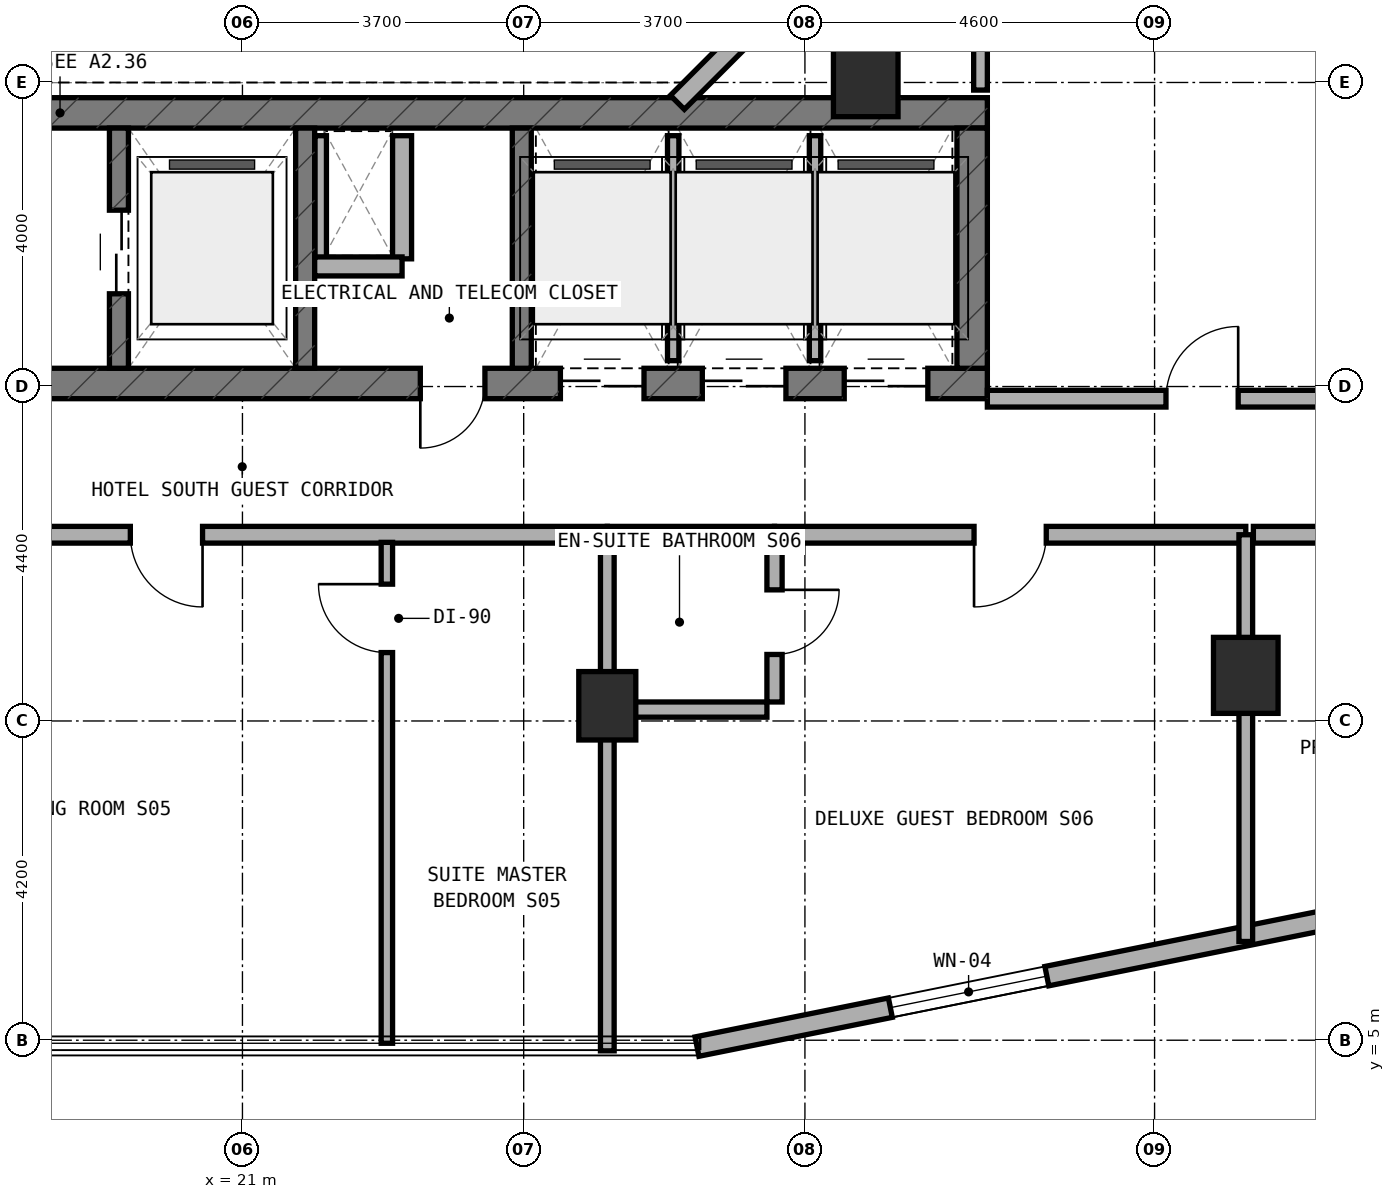
"""IFC4 building model, lengths in metres.
Left out: names, types, materials, properties, quantities, classifications, styles, units other than length and angle.
Written with IfcOpenShell. Run it as: python <this file> out.ifc"""

import sys

from ifc_helpers import new_model, si_unit, direction, frame, frame_2d, origin, origin_2d, place, context, subcontext, project, spatial, rectangle, extrude, element, fill, save


model = new_model("IFC4")
c1 = context("Model", 3, precision=1e-05, world=origin(), true_north=direction((0.0, 1.0)))
c2 = subcontext(c1, "Body", "Model", "MODEL_VIEW")
j1 = project(units=[si_unit("LENGTHUNIT", "METRE"), si_unit("PLANEANGLEUNIT", "RADIAN")], contexts=[c1])
p1 = place(None, origin())
s1 = spatial("IfcSite", under=j1, at=p1, CompositionType="ELEMENT")
p2 = place(p1, origin())
s2 = spatial("IfcBuilding", under=s1, at=p2, CompositionType="ELEMENT")
p3 = place(p2, frame((0.0, 0.0, 159.0)))
s3 = spatial("IfcBuildingStorey", under=s2, at=p3, CompositionType="ELEMENT", Elevation=159.0)
p4 = place(p3, frame((6.4, 13.64, 0.0), z_axis=(0.0, 0.0, 1.0), x_axis=(1.0, 0.0, 0.0)))
e1 = element("IfcWall", 1, at=p4, inside=s3, PredefinedType="SHEAR", context=c2, shape_type="SweptSolid", body=[
    extrude(rectangle(XDim=24.4, YDim=0.4, at=frame_2d((12.2, 0.0))), origin(), (0.0, 0.0, 1.0), 3.5),
])
p5 = place(p4, frame((9.15, 0.0, 0.0)))
e2 = element("IfcOpeningElement", 2, at=p5, cuts=e1, PredefinedType="OPENING", context=c2, shape_type="SweptSolid", body=[
    extrude(rectangle(XDim=1.2, YDim=2.15, at=frame_2d((0.6, 1.075))), frame((0.0, 0.21, 0.0), z_axis=(0.0, -1.0, 0.0), x_axis=(1.0, 0.0, 0.0)), (0.0, 0.0, 1.0), 0.42),
])
p6 = place(p4, frame((16.94, 0.0, 0.0)))
e3 = element("IfcOpeningElement", 3, at=p6, cuts=e1, PredefinedType="OPENING", context=c2, shape_type="SweptSolid", body=[
    extrude(rectangle(XDim=0.85, YDim=2.1, at=frame_2d((0.425, 1.05))), frame((0.0, 0.21, 0.0), z_axis=(0.0, -1.0, 0.0), x_axis=(1.0, 0.0, 0.0)), (0.0, 0.0, 1.0), 0.42),
])
p7 = place(p4, frame((18.783, 0.0, 0.0)))
e4 = element("IfcOpeningElement", 4, at=p7, cuts=e1, PredefinedType="OPENING", context=c2, shape_type="SweptSolid", body=[
    extrude(rectangle(XDim=1.1, YDim=2.15, at=frame_2d((0.55, 1.075))), frame((0.0, 0.21, 0.0), z_axis=(0.0, -1.0, 0.0), x_axis=(1.0, 0.0, 0.0)), (0.0, 0.0, 1.0), 0.42),
])
p8 = place(p4, frame((20.65, 0.0, 0.0)))
e5 = element("IfcOpeningElement", 5, at=p8, cuts=e1, PredefinedType="OPENING", context=c2, shape_type="SweptSolid", body=[
    extrude(rectangle(XDim=1.1, YDim=2.15, at=frame_2d((0.55, 1.075))), frame((0.0, 0.21, 0.0), z_axis=(0.0, -1.0, 0.0), x_axis=(1.0, 0.0, 0.0)), (0.0, 0.0, 1.0), 0.42),
])
p9 = place(p4, frame((22.517, 0.0, 0.0)))
e6 = element("IfcOpeningElement", 6, at=p9, cuts=e1, PredefinedType="OPENING", context=c2, shape_type="SweptSolid", body=[
    extrude(rectangle(XDim=1.1, YDim=2.15, at=frame_2d((0.55, 1.075))), frame((0.0, 0.21, 0.0), z_axis=(0.0, -1.0, 0.0), x_axis=(1.0, 0.0, 0.0)), (0.0, 0.0, 1.0), 0.42),
])
p10 = place(p3, frame((6.4, 17.2, 0.0), z_axis=(0.0, 0.0, 1.0), x_axis=(1.0, 0.0, 0.0)))
e7 = element("IfcWall", 7, at=p10, inside=s3, PredefinedType="SHEAR", context=c2, shape_type="SweptSolid", body=[
    extrude(rectangle(XDim=24.4, YDim=0.4, at=frame_2d((12.2, 0.0))), origin(), (0.0, 0.0, 1.0), 3.5),
])
p11 = place(p3, frame((30.6, 13.84, 0.0), z_axis=(0.0, 0.0, 1.0), x_axis=(0.0, 1.0, 0.0)))
e8 = element("IfcWall", 8, at=p11, inside=s3, PredefinedType="SHEAR", context=c2, shape_type="SweptSolid", body=[
    extrude(rectangle(XDim=3.16, YDim=0.4, at=frame_2d((1.58, 0.0))), origin(), (0.0, 0.0, 1.0), 3.5),
])
p12 = place(p3, frame((19.375, 13.84, 0.0), z_axis=(0.0, 0.0, 1.0), x_axis=(0.0, 1.0, 0.0)))
e9 = element("IfcWall", 9, at=p12, inside=s3, PredefinedType="STANDARD", context=c2, shape_type="SweptSolid", body=[
    extrude(rectangle(XDim=3.16, YDim=0.25, at=frame_2d((1.58, 0.0))), origin(), (0.0, 0.0, 1.0), 3.22),
])
p13 = place(p12, frame((0.98, 0.0, 0.0)))
e10 = element("IfcOpeningElement", 10, at=p13, cuts=e9, PredefinedType="OPENING", context=c2, shape_type="SweptSolid", body=[
    extrude(rectangle(XDim=1.1, YDim=2.15, at=frame_2d((0.55, 1.075))), frame((0.0, 0.135, 0.0), z_axis=(0.0, -1.0, 0.0), x_axis=(1.0, 0.0, 0.0)), (0.0, 0.0, 1.0), 0.27),
])
for number, where, z_axis, x_axis in (
    (11, (21.825, 13.84, 0.0), (0.0, 0.0, 1.0), (0.0, 1.0, 0.0)),
    (12, (24.675, 13.84, 0.0), (0.0, 0.0, 1.0), (0.0, 1.0, 0.0)),
):
    element("IfcWall", number, at=place(p3, frame(where, z_axis=z_axis, x_axis=x_axis)), inside=s3, PredefinedType="STANDARD", context=c2, shape_type="SweptSolid", body=[
        extrude(rectangle(XDim=3.16, YDim=0.25, at=frame_2d((1.58, 0.0))), origin(), (0.0, 0.0, 1.0), 3.22),
    ])
p14 = place(p3, frame((25.8, 9.4, 0.0), z_axis=(0.0, 0.0, 1.0), x_axis=(1.0, 0.0, 0.0)))
e13 = element("IfcColumn", 13, at=p14, inside=s3, PredefinedType="COLUMN", context=c2, shape_type="SweptSolid", body=[
    extrude(rectangle(XDim=0.75, YDim=0.9, at=origin_2d()), origin(), (0.0, 0.0, 1.0), 3.5),
])
for number, where, z_axis, x_axis in (
    (14, (34.2, 9.8, 0.0), (0.0, 0.0, 1.0), (1.0, 0.0, 0.0)),
    (15, (29.2, 17.65, 0.0), (0.0, 0.0, 1.0), (1.0, 0.0, 0.0)),
):
    element("IfcColumn", number, at=place(p3, frame(where, z_axis=z_axis, x_axis=x_axis)), inside=s3, PredefinedType="COLUMN", context=c2, shape_type="SweptSolid", body=[
        extrude(rectangle(XDim=0.85, YDim=1.0, at=origin_2d()), origin(), (0.0, 0.0, 1.0), 3.5),
    ])
p15 = place(p3, frame((26.98, 4.916, 0.0), z_axis=(0.0, 0.0, 1.0), x_axis=(0.980315963543, 0.197435082048, 0.0)))
e16 = element("IfcWall", 16, at=p15, inside=s3, PredefinedType="STANDARD", context=c2, shape_type="SweptSolid", body=[
    extrude(rectangle(XDim=9.183, YDim=0.26, at=frame_2d((4.591, 0.0))), origin(), (0.0, 0.0, 1.0), 3.22),
])
p16 = place(p15, frame((2.595, 0.0, 0.85)))
e17 = element("IfcOpeningElement", 17, at=p16, cuts=e16, PredefinedType="OPENING", context=c2, shape_type="SweptSolid", body=[
    extrude(rectangle(XDim=2.1, YDim=1.5, at=frame_2d((1.05, 0.75))), frame((0.0, 0.14, 0.0), z_axis=(0.0, -1.0, 0.0), x_axis=(1.0, 0.0, 0.0)), (0.0, 0.0, 1.0), 0.28),
])
p17 = place(p3, frame((26.722, 17.338, 0.0), z_axis=(0.0, 0.0, 1.0), x_axis=(0.707059717605, 0.707153841636, 0.0)))
e18 = element("IfcWall", 18, at=p17, inside=s3, PredefinedType="STANDARD", context=c2, shape_type="SweptSolid", body=[
    extrude(rectangle(XDim=2.594, YDim=0.26, at=frame_2d((1.297, 0.0))), origin(), (0.0, 0.0, 1.0), 3.22),
])
p18 = place(p3, frame((22.03, 15.28, 0.0), z_axis=(0.0, 0.0, 1.0), x_axis=(0.0, 1.0, 0.0)))
e19 = element("IfcWall", 19, at=p18, inside=s3, PredefinedType="PARTITIONING", context=c2, shape_type="SweptSolid", body=[
    extrude(rectangle(XDim=1.62, YDim=0.15, at=frame_2d((0.81, 0.0))), origin(), (0.0, 0.0, 1.0), 3.22),
])
p19 = place(p3, frame((23.1, 15.28, 0.0), z_axis=(0.0, 0.0, 1.0), x_axis=(0.0, 1.0, 0.0)))
e20 = element("IfcWall", 20, at=p19, inside=s3, PredefinedType="SOLIDWALL", context=c2, shape_type="SweptSolid", body=[
    extrude(rectangle(XDim=1.62, YDim=0.25, at=frame_2d((0.81, 0.0))), origin(), (0.0, 0.0, 1.0), 3.22),
])
p20 = place(p3, frame((21.95, 15.18, 0.0), z_axis=(0.0, 0.0, 1.0), x_axis=(1.0, 0.0, 0.0)))
e21 = element("IfcWall", 21, at=p20, inside=s3, PredefinedType="SOLIDWALL", context=c2, shape_type="SweptSolid", body=[
    extrude(rectangle(XDim=1.15, YDim=0.25, at=frame_2d((0.575, 0.0))), origin(), (0.0, 0.0, 1.0), 3.22),
])
p21 = place(p3, frame((26.667, 13.94, 0.0), z_axis=(0.0, 0.0, 1.0), x_axis=(0.0, 1.0, 0.0)))
e22 = element("IfcWall", 22, at=p21, inside=s3, PredefinedType="PARTITIONING", context=c2, shape_type="SweptSolid", body=[
    extrude(rectangle(XDim=2.96, YDim=0.15, at=frame_2d((1.48, 0.0))), origin(), (0.0, 0.0, 1.0), 3.22),
])
p22 = place(p3, frame((28.533, 13.94, 0.0), z_axis=(0.0, 0.0, 1.0), x_axis=(0.0, 1.0, 0.0)))
e23 = element("IfcWall", 23, at=p22, inside=s3, PredefinedType="PARTITIONING", context=c2, shape_type="SweptSolid", body=[
    extrude(rectangle(XDim=2.96, YDim=0.15, at=frame_2d((1.48, 0.0))), origin(), (0.0, 0.0, 1.0), 2.795),
])
p23 = place(p3, frame((14.2, 11.65, 0.0), z_axis=(0.0, 0.0, 1.0), x_axis=(1.0, 0.0, 0.0)))
e24 = element("IfcWall", 24, at=p23, inside=s3, PredefinedType="SOLIDWALL", context=c2, shape_type="SweptSolid", body=[
    extrude(rectangle(XDim=11.6, YDim=0.22, at=frame_2d((5.8, 0.0))), origin(), (0.0, 0.0, 1.0), 2.795),
])
p24 = place(p23, frame((5.325, 0.0, 0.0)))
e25 = element("IfcOpeningElement", 25, at=p24, cuts=e24, PredefinedType="OPENING", context=c2, shape_type="SweptSolid", body=[
    extrude(rectangle(XDim=0.95, YDim=2.1, at=frame_2d((0.475, 1.05))), frame((0.0, 0.12, 0.0), z_axis=(0.0, -1.0, 0.0), x_axis=(1.0, 0.0, 0.0)), (0.0, 0.0, 1.0), 0.24),
])
p25 = place(p3, frame((22.9, 4.96, 0.0), z_axis=(0.0, 0.0, 1.0), x_axis=(0.0, 1.0, 0.0)))
e26 = element("IfcWall", 26, at=p25, inside=s3, PredefinedType="PARTITIONING", context=c2, shape_type="SweptSolid", body=[
    extrude(rectangle(XDim=6.59, YDim=0.15, at=frame_2d((3.295, 0.0))), origin(), (0.0, 0.0, 1.0), 2.835),
])
p26 = place(p25, frame((5.14, 0.0, 0.0)))
e27 = element("IfcOpeningElement", 27, at=p26, cuts=e26, PredefinedType="OPENING", context=c2, shape_type="SweptSolid", body=[
    extrude(rectangle(XDim=0.9, YDim=2.1, at=frame_2d((0.45, 1.05))), frame((0.0, 0.085, 0.0), z_axis=(0.0, -1.0, 0.0), x_axis=(1.0, 0.0, 0.0)), (0.0, 0.0, 1.0), 0.17),
])
p27 = place(p3, frame((25.8, 4.86, 0.0), z_axis=(0.0, 0.0, 1.0), x_axis=(0.0, 1.0, 0.0)))
e28 = element("IfcWall", 28, at=p27, inside=s3, PredefinedType="SOLIDWALL", context=c2, shape_type="SweptSolid", body=[
    extrude(rectangle(XDim=6.79, YDim=0.18, at=frame_2d((3.395, 0.0))), origin(), (0.0, 0.0, 1.0), 2.795),
])
p28 = place(p3, frame((28.0, 9.45, 0.0), z_axis=(0.0, 0.0, 1.0), x_axis=(0.0, 1.0, 0.0)))
e29 = element("IfcWall", 29, at=p28, inside=s3, PredefinedType="PLUMBINGWALL", context=c2, shape_type="SweptSolid", body=[
    extrude(rectangle(XDim=2.1, YDim=0.2, at=frame_2d((1.05, 0.0))), origin(), (0.0, 0.0, 1.0), 2.835),
])
p29 = place(p28, frame((0.625, 0.0, 0.0)))
e30 = element("IfcOpeningElement", 30, at=p29, cuts=e29, PredefinedType="OPENING", context=c2, shape_type="SweptSolid", body=[
    extrude(rectangle(XDim=0.85, YDim=2.1, at=frame_2d((0.425, 1.05))), frame((0.0, 0.11, 0.0), z_axis=(0.0, -1.0, 0.0), x_axis=(1.0, 0.0, 0.0)), (0.0, 0.0, 1.0), 0.22),
])
p30 = place(p3, frame((25.9, 9.35, 0.0), z_axis=(0.0, 0.0, 1.0), x_axis=(1.0, 0.0, 0.0)))
e31 = element("IfcWall", 31, at=p30, inside=s3, PredefinedType="PLUMBINGWALL", context=c2, shape_type="SweptSolid", body=[
    extrude(rectangle(XDim=2.0, YDim=0.2, at=frame_2d((1.0, 0.0))), origin(), (0.0, 0.0, 1.0), 2.835),
])
p31 = place(p3, frame((25.8, 11.65, 0.0), z_axis=(0.0, 0.0, 1.0), x_axis=(1.0, 0.0, 0.0)))
e32 = element("IfcWall", 32, at=p31, inside=s3, PredefinedType="SOLIDWALL", context=c2, shape_type="SweptSolid", body=[
    extrude(rectangle(XDim=2.2, YDim=0.22, at=frame_2d((1.1, 0.0))), origin(), (0.0, 0.0, 1.0), 2.795),
])
p32 = place(p3, frame((28.0, 11.65, 0.0), z_axis=(0.0, 0.0, 1.0), x_axis=(1.0, 0.0, 0.0)))
e33 = element("IfcWall", 33, at=p32, inside=s3, PredefinedType="SOLIDWALL", context=c2, shape_type="SweptSolid", body=[
    extrude(rectangle(XDim=6.2, YDim=0.22, at=frame_2d((3.1, 0.0))), origin(), (0.0, 0.0, 1.0), 2.795),
])
p33 = place(p32, frame((2.625, 0.0, 0.0)))
e34 = element("IfcOpeningElement", 34, at=p33, cuts=e33, PredefinedType="OPENING", context=c2, shape_type="SweptSolid", body=[
    extrude(rectangle(XDim=0.95, YDim=2.1, at=frame_2d((0.475, 1.05))), frame((0.0, 0.12, 0.0), z_axis=(0.0, -1.0, 0.0), x_axis=(1.0, 0.0, 0.0)), (0.0, 0.0, 1.0), 0.24),
])
p34 = place(p3, frame((34.2, 6.299, 0.0), z_axis=(0.0, 0.0, 1.0), x_axis=(0.0, 1.0, 0.0)))
e35 = element("IfcWall", 35, at=p34, inside=s3, PredefinedType="SOLIDWALL", context=c2, shape_type="SweptSolid", body=[
    extrude(rectangle(XDim=5.351, YDim=0.18, at=frame_2d((2.675, 0.0))), origin(), (0.0, 0.0, 1.0), 2.795),
])
p35 = place(p3, frame((34.3, 11.65, 0.0), z_axis=(0.0, 0.0, 1.0), x_axis=(1.0, 0.0, 0.0)))
e36 = element("IfcWall", 36, at=p35, inside=s3, PredefinedType="SOLIDWALL", context=c2, shape_type="SweptSolid", body=[
    extrude(rectangle(XDim=6.64, YDim=0.22, at=frame_2d((3.32, 0.0))), origin(), (0.0, 0.0, 1.0), 2.835),
])
p36 = place(p35, frame((2.55, 0.0, 0.0)))
e37 = element("IfcOpeningElement", 37, at=p36, cuts=e36, PredefinedType="OPENING", context=c2, shape_type="SweptSolid", body=[
    extrude(rectangle(XDim=0.95, YDim=2.1, at=frame_2d((0.475, 1.05))), frame((0.0, 0.12, 0.0), z_axis=(0.0, -1.0, 0.0), x_axis=(1.0, 0.0, 0.0)), (0.0, 0.0, 1.0), 0.24),
])
p37 = place(p3, frame((30.71, 17.5, 0.0), z_axis=(0.0, 0.0, 1.0), x_axis=(0.0, 1.0, 0.0)))
e38 = element("IfcWall", 38, at=p37, inside=s3, PredefinedType="SOLIDWALL", context=c2, shape_type="SweptSolid", body=[
    extrude(rectangle(XDim=15.0, YDim=0.18, at=frame_2d((7.5, 0.0))), origin(), (0.0, 0.0, 1.0), 2.795),
])
p38 = place(p3, frame((30.8, 13.44, 0.0), z_axis=(0.0, 0.0, 1.0), x_axis=(1.0, 0.0, 0.0)))
e39 = element("IfcWall", 39, at=p38, inside=s3, PredefinedType="SOLIDWALL", context=c2, shape_type="SweptSolid", body=[
    extrude(rectangle(XDim=5.65, YDim=0.22, at=frame_2d((2.825, 0.0))), origin(), (0.0, 0.0, 1.0), 2.795),
])
p39 = place(p38, frame((2.35, 0.0, 0.0)))
e40 = element("IfcOpeningElement", 40, at=p39, cuts=e39, PredefinedType="OPENING", context=c2, shape_type="SweptSolid", body=[
    extrude(rectangle(XDim=0.95, YDim=2.1, at=frame_2d((0.475, 1.05))), frame((0.0, 0.12, 0.0), z_axis=(0.0, -1.0, 0.0), x_axis=(1.0, 0.0, 0.0)), (0.0, 0.0, 1.0), 0.24),
])
p40 = place(p16, origin())
e41 = element("IfcWindow", 41, at=p40, inside=s3, PartitioningType="SINGLE_PANEL", PredefinedType="WINDOW", context=c2, shape_type="SweptSolid", body=[
    extrude(rectangle(XDim=2.1, YDim=1.5, at=frame_2d((1.05, 0.75))), frame((0.0, 0.03, 0.0), z_axis=(0.0, -1.0, 0.0), x_axis=(1.0, 0.0, 0.0)), (0.0, 0.0, 1.0), 0.06),
])
fill(e17, e41)
p41 = place(p13, origin())
e42 = element("IfcDoor", 42, at=p41, inside=s3, OperationType="DOUBLE_DOOR_SLIDING", PredefinedType="DOOR", context=c2, shape_type="SweptSolid", body=[
    extrude(rectangle(XDim=1.1, YDim=2.15, at=frame_2d((0.55, 1.075))), frame((0.0, 0.025, 0.0), z_axis=(0.0, -1.0, 0.0), x_axis=(1.0, 0.0, 0.0)), (0.0, 0.0, 1.0), 0.05),
])
fill(e10, e42)
p42 = place(p6, frame((0.85, 0.0, 0.0), z_axis=(0.0, 0.0, 1.0), x_axis=(-1.0, 0.0, 0.0)))
e43 = element("IfcDoor", 43, at=p42, inside=s3, OperationType="SINGLE_SWING_RIGHT", PredefinedType="DOOR", context=c2, shape_type="SweptSolid", body=[
    extrude(rectangle(XDim=0.85, YDim=2.1, at=frame_2d((0.425, 1.05))), frame((0.0, 0.025, 0.0), z_axis=(0.0, -1.0, 0.0), x_axis=(1.0, 0.0, 0.0)), (0.0, 0.0, 1.0), 0.05),
])
fill(e3, e43)
p43 = place(p7, frame((1.1, 0.0, 0.0), z_axis=(0.0, 0.0, 1.0), x_axis=(-1.0, 0.0, 0.0)))
e44 = element("IfcDoor", 44, at=p43, inside=s3, OperationType="DOUBLE_DOOR_SLIDING", PredefinedType="DOOR", context=c2, shape_type="SweptSolid", body=[
    extrude(rectangle(XDim=1.1, YDim=2.15, at=frame_2d((0.55, 1.075))), frame((0.0, 0.025, 0.0), z_axis=(0.0, -1.0, 0.0), x_axis=(1.0, 0.0, 0.0)), (0.0, 0.0, 1.0), 0.05),
])
fill(e4, e44)
p44 = place(p8, frame((1.1, 0.0, 0.0), z_axis=(0.0, 0.0, 1.0), x_axis=(-1.0, 0.0, 0.0)))
e45 = element("IfcDoor", 45, at=p44, inside=s3, OperationType="DOUBLE_DOOR_SLIDING", PredefinedType="DOOR", context=c2, shape_type="SweptSolid", body=[
    extrude(rectangle(XDim=1.1, YDim=2.15, at=frame_2d((0.55, 1.075))), frame((0.0, 0.025, 0.0), z_axis=(0.0, -1.0, 0.0), x_axis=(1.0, 0.0, 0.0)), (0.0, 0.0, 1.0), 0.05),
])
fill(e5, e45)
p45 = place(p9, frame((1.1, 0.0, 0.0), z_axis=(0.0, 0.0, 1.0), x_axis=(-1.0, 0.0, 0.0)))
e46 = element("IfcDoor", 46, at=p45, inside=s3, OperationType="DOUBLE_DOOR_SLIDING", PredefinedType="DOOR", context=c2, shape_type="SweptSolid", body=[
    extrude(rectangle(XDim=1.1, YDim=2.15, at=frame_2d((0.55, 1.075))), frame((0.0, 0.025, 0.0), z_axis=(0.0, -1.0, 0.0), x_axis=(1.0, 0.0, 0.0)), (0.0, 0.0, 1.0), 0.05),
])
fill(e6, e46)
p46 = place(p24, frame((0.95, 0.0, 0.0), z_axis=(0.0, 0.0, 1.0), x_axis=(-1.0, 0.0, 0.0)))
e47 = element("IfcDoor", 47, at=p46, inside=s3, OperationType="SINGLE_SWING_LEFT", PredefinedType="DOOR", context=c2, shape_type="SweptSolid", body=[
    extrude(rectangle(XDim=0.95, YDim=2.1, at=frame_2d((0.475, 1.05))), frame((0.0, 0.025, 0.0), z_axis=(0.0, -1.0, 0.0), x_axis=(1.0, 0.0, 0.0)), (0.0, 0.0, 1.0), 0.05),
])
fill(e25, e47)
p47 = place(p26, origin())
e48 = element("IfcDoor", 48, at=p47, inside=s3, OperationType="SINGLE_SWING_RIGHT", PredefinedType="DOOR", context=c2, shape_type="SweptSolid", body=[
    extrude(rectangle(XDim=0.9, YDim=2.1, at=frame_2d((0.45, 1.05))), frame((0.0, 0.025, 0.0), z_axis=(0.0, -1.0, 0.0), x_axis=(1.0, 0.0, 0.0)), (0.0, 0.0, 1.0), 0.05),
])
fill(e27, e48)
p48 = place(p29, frame((0.85, 0.0, 0.0), z_axis=(0.0, 0.0, 1.0), x_axis=(-1.0, 0.0, 0.0)))
e49 = element("IfcDoor", 49, at=p48, inside=s3, OperationType="SINGLE_SWING_LEFT", PredefinedType="DOOR", context=c2, shape_type="SweptSolid", body=[
    extrude(rectangle(XDim=0.85, YDim=2.1, at=frame_2d((0.425, 1.05))), frame((0.0, 0.025, 0.0), z_axis=(0.0, -1.0, 0.0), x_axis=(1.0, 0.0, 0.0)), (0.0, 0.0, 1.0), 0.05),
])
fill(e30, e49)
p49 = place(p33, frame((0.95, 0.0, 0.0), z_axis=(0.0, 0.0, 1.0), x_axis=(-1.0, 0.0, 0.0)))
e50 = element("IfcDoor", 50, at=p49, inside=s3, OperationType="SINGLE_SWING_RIGHT", PredefinedType="DOOR", context=c2, shape_type="SweptSolid", body=[
    extrude(rectangle(XDim=0.95, YDim=2.1, at=frame_2d((0.475, 1.05))), frame((0.0, 0.025, 0.0), z_axis=(0.0, -1.0, 0.0), x_axis=(1.0, 0.0, 0.0)), (0.0, 0.0, 1.0), 0.05),
])
fill(e34, e50)
p50 = place(p39, origin())
e51 = element("IfcDoor", 51, at=p50, inside=s3, OperationType="SINGLE_SWING_RIGHT", PredefinedType="DOOR", context=c2, shape_type="SweptSolid", body=[
    extrude(rectangle(XDim=0.95, YDim=2.1, at=frame_2d((0.475, 1.05))), frame((0.0, 0.025, 0.0), z_axis=(0.0, -1.0, 0.0), x_axis=(1.0, 0.0, 0.0)), (0.0, 0.0, 1.0), 0.05),
])
fill(e40, e51)
save(model, sys.argv[1])
